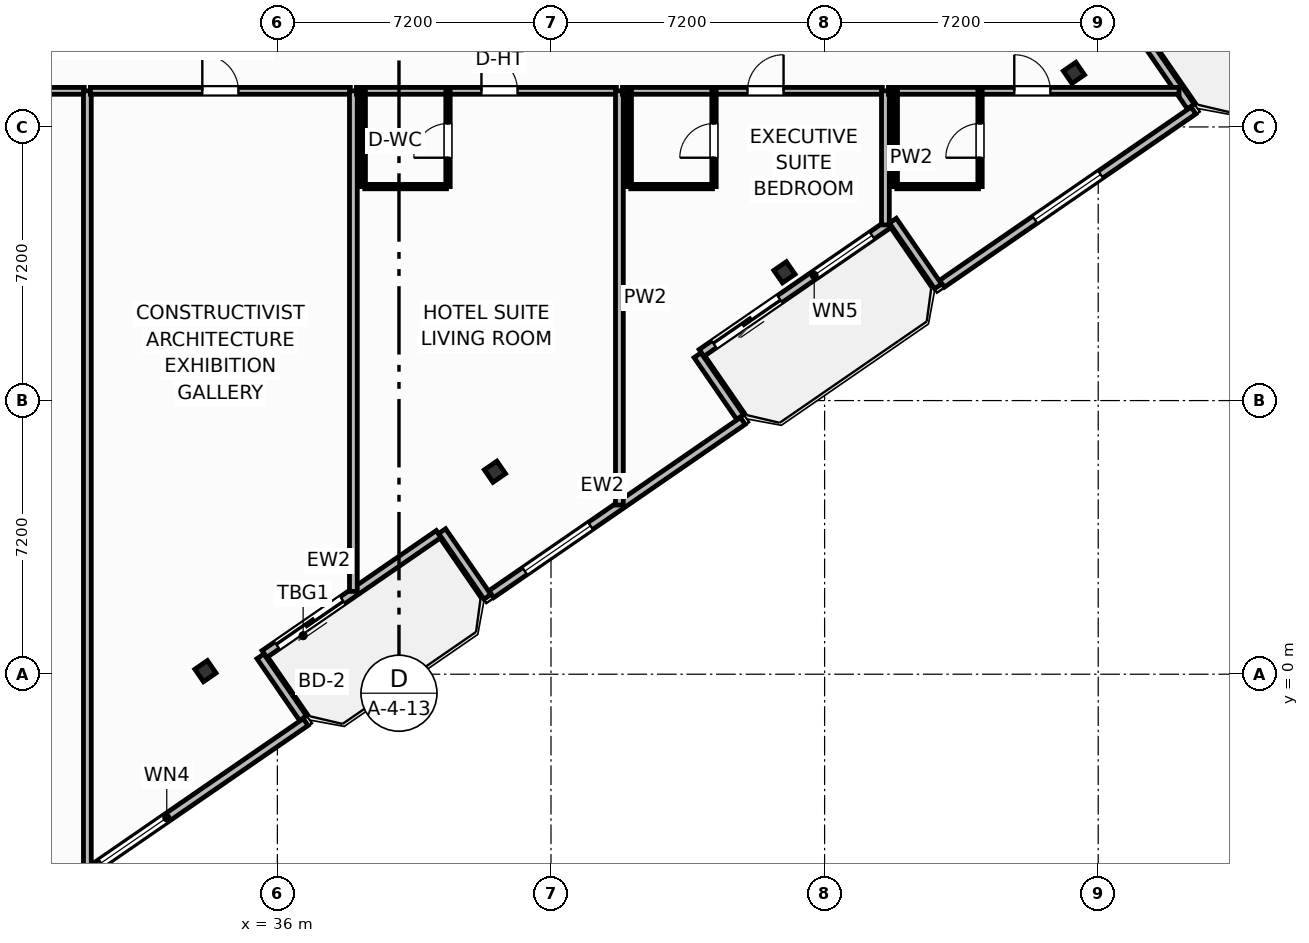
"""IFC4 building model, lengths in metres.
Left out: names, types, materials, properties, quantities, classifications, styles, units other than length and angle.
Written with IfcOpenShell. Run it as: python <this file> out.ifc"""

import sys

from ifc_helpers import new_model, si_unit, direction, frame, frame_2d, origin, origin_2d, place, context, subcontext, project, spatial, rectangle, i_section, extrude, element, fill, save


model = new_model("IFC4")
c1 = context("Model", 3, precision=1e-05, world=origin(), true_north=direction((0.0, 1.0)))
c2 = subcontext(c1, "Body", "Model", "MODEL_VIEW")
j1 = project(units=[si_unit("LENGTHUNIT", "METRE"), si_unit("PLANEANGLEUNIT", "RADIAN")], contexts=[c1])
p1 = place(None, origin())
s1 = spatial("IfcSite", under=j1, at=p1, CompositionType="ELEMENT")
p2 = place(p1, origin())
s2 = spatial("IfcBuilding", under=s1, at=p2, CompositionType="ELEMENT")
p3 = place(p2, frame((0.0, 0.0, 265.6)))
s3 = spatial("IfcBuildingStorey", under=s2, at=p3, CompositionType="ELEMENT", Elevation=265.6)
for number, where, z_axis, x_axis in (
    (1, (34.107, 0.081, 0.0), (0.0, 0.0, 1.0), (0.824, 0.567, 0.0)),
    (2, (41.725, 5.328, 0.0), (0.0, 0.0, 1.0), (0.824, 0.567, 0.0)),
    (3, (49.343, 10.575, 0.0), (0.0, 0.0, 1.0), (0.824, 0.567, 0.0)),
    (4, (56.96, 15.823, 0.0), (0.0, 0.0, 1.0), (0.824, 0.567, 0.0)),
):
    element("IfcColumn", number, at=place(p3, frame(where, z_axis=z_axis, x_axis=x_axis)), inside=s3, PredefinedType="COLUMN", context=c2, shape_type="SweptSolid", body=[
        extrude(i_section(OverallWidth=0.401, OverallDepth=0.399, WebThickness=0.025, FlangeThickness=0.04, FilletRadius=0.022, at=origin_2d()), origin(), (0.0, 0.0, 1.0), 3.7),
    ])
p4 = place(p3, frame((40.244, 3.688, 0.0), z_axis=(0.0, 0.0, 1.0), x_axis=(-0.823541290762, -0.567256328665, 0.0)))
e5 = element("IfcWall", 5, at=p4, inside=s3, PredefinedType="SOLIDWALL", context=c2, shape_type="SweptSolid", body=[
    extrude(rectangle(XDim=5.567, YDim=0.22, at=frame_2d((2.784, 0.0))), origin(), (0.0, 0.0, 1.0), 2.73),
])
p5 = place(p4, frame((3.067, 0.0, 0.0)))
e6 = element("IfcOpeningElement", 6, at=p5, cuts=e5, PredefinedType="OPENING", context=c2, shape_type="SweptSolid", body=[
    extrude(rectangle(XDim=2.1, YDim=2.3, at=frame_2d((1.05, 1.15))), frame((0.0, 0.12, 0.0), z_axis=(0.0, -1.0, 0.0), x_axis=(1.0, 0.0, 0.0)), (0.0, 0.0, 1.0), 0.24),
])
p6 = place(p3, frame((52.103, 11.857, 0.0), z_axis=(0.0, 0.0, 1.0), x_axis=(-0.823534636215, -0.567265989598, 0.0)))
e7 = element("IfcWall", 7, at=p6, inside=s3, PredefinedType="SOLIDWALL", context=c2, shape_type="SweptSolid", body=[
    extrude(rectangle(XDim=6.0, YDim=0.22, at=frame_2d((3.0, 0.0))), origin(), (0.0, 0.0, 1.0), 2.73),
])
p7 = place(p6, frame((3.5, 0.0, 0.0)))
e8 = element("IfcOpeningElement", 8, at=p7, cuts=e7, PredefinedType="OPENING", context=c2, shape_type="SweptSolid", body=[
    extrude(rectangle(XDim=2.1, YDim=2.3, at=frame_2d((1.05, 1.15))), frame((0.0, 0.12, 0.0), z_axis=(0.0, -1.0, 0.0), x_axis=(1.0, 0.0, 0.0)), (0.0, 0.0, 1.0), 0.24),
])
p8 = place(p6, frame((0.55, 0.0, 0.75)))
e9 = element("IfcOpeningElement", 9, at=p8, cuts=e7, PredefinedType="OPENING", context=c2, shape_type="SweptSolid", body=[
    extrude(rectangle(XDim=1.85, YDim=1.75, at=frame_2d((0.925, 0.875))), frame((0.0, 0.12, 0.0), z_axis=(0.0, -1.0, 0.0), x_axis=(1.0, 0.0, 0.0)), (0.0, 0.0, 1.0), 0.24),
])
p9 = place(p3, frame((27.704, -7.488, 0.0), z_axis=(0.0, 0.0, 1.0), x_axis=(0.823529068157, 0.567274073003, 0.0)))
e10 = element("IfcWall", 10, at=p9, inside=s3, PredefinedType="SOLIDWALL", context=c2, shape_type="SweptSolid", body=[
    extrude(rectangle(XDim=10.98, YDim=0.22, at=frame_2d((5.49, 0.0))), origin(), (0.0, 0.0, 1.0), 2.73),
])
p10 = place(p9, frame((4.44, 0.0, 0.8)))
e11 = element("IfcOpeningElement", 11, at=p10, cuts=e10, PredefinedType="OPENING", context=c2, shape_type="SweptSolid", body=[
    extrude(rectangle(XDim=2.1, YDim=1.75, at=frame_2d((1.05, 0.875))), frame((0.0, 0.12, 0.0), z_axis=(0.0, -1.0, 0.0), x_axis=(1.0, 0.0, 0.0)), (0.0, 0.0, 1.0), 0.24),
])
p11 = place(p3, frame((36.675, -1.156, 0.0), z_axis=(0.0, 0.0, 1.0), x_axis=(-0.567215821234, 0.823569190865, 0.0)))
e12 = element("IfcWall", 12, at=p11, inside=s3, PredefinedType="SOLIDWALL", context=c2, shape_type="SweptSolid", body=[
    extrude(rectangle(XDim=1.975, YDim=0.22, at=frame_2d((0.988, 0.0))), origin(), (0.0, 0.0, 1.0), 2.73),
])
p12 = place(p3, frame((40.337, 3.765, 0.0), z_axis=(0.0, 0.0, 1.0), x_axis=(0.567352541689, -0.823475010816, 0.0)))
e13 = element("IfcWall", 13, at=p12, inside=s3, PredefinedType="SOLIDWALL", context=c2, shape_type="SweptSolid", body=[
    extrude(rectangle(XDim=2.1, YDim=0.22, at=frame_2d((1.05, 0.0))), origin(), (0.0, 0.0, 1.0), 2.73),
])
p13 = place(p3, frame((41.631, 2.106, 0.0), z_axis=(0.0, 0.0, 1.0), x_axis=(0.823530942962, 0.56727135128, 0.0)))
e14 = element("IfcWall", 14, at=p13, inside=s3, PredefinedType="SOLIDWALL", context=c2, shape_type="SweptSolid", body=[
    extrude(rectangle(XDim=8.035, YDim=0.22, at=frame_2d((4.018, 0.0))), origin(), (0.0, 0.0, 1.0), 2.73),
])
p14 = place(p13, frame((1.068, 0.0, 0.8)))
e15 = element("IfcOpeningElement", 15, at=p14, cuts=e14, PredefinedType="OPENING", context=c2, shape_type="SweptSolid", body=[
    extrude(rectangle(XDim=2.1, YDim=1.75, at=frame_2d((1.05, 0.875))), frame((0.0, 0.12, 0.0), z_axis=(0.0, -1.0, 0.0), x_axis=(1.0, 0.0, 0.0)), (0.0, 0.0, 1.0), 0.24),
])
p15 = place(p3, frame((48.177, 6.767, 0.0), z_axis=(0.0, 0.0, 1.0), x_axis=(-0.567273565974, 0.823529417415, 0.0)))
e16 = element("IfcWall", 16, at=p15, inside=s3, PredefinedType="SOLIDWALL", context=c2, shape_type="SweptSolid", body=[
    extrude(rectangle(XDim=1.975, YDim=0.22, at=frame_2d((0.988, 0.0))), origin(), (0.0, 0.0, 1.0), 2.73),
])
p16 = place(p3, frame((52.196, 11.933, 0.0), z_axis=(0.0, 0.0, 1.0), x_axis=(0.56729822855, -0.823512428494, 0.0)))
e17 = element("IfcWall", 17, at=p16, inside=s3, PredefinedType="SOLIDWALL", context=c2, shape_type="SweptSolid", body=[
    extrude(rectangle(XDim=2.1, YDim=0.22, at=frame_2d((1.05, 0.0))), origin(), (0.0, 0.0, 1.0), 2.73),
])
p17 = place(p3, frame((53.49, 10.275, 0.0), z_axis=(0.0, 0.0, 1.0), x_axis=(0.823530942962, 0.56727135128, 0.0)))
e18 = element("IfcWall", 18, at=p17, inside=s3, PredefinedType="SOLIDWALL", context=c2, shape_type="SweptSolid", body=[
    extrude(rectangle(XDim=8.035, YDim=0.22, at=frame_2d((4.018, 0.0))), origin(), (0.0, 0.0, 1.0), 2.73),
])
p18 = place(p17, frame((2.968, 0.0, 0.8)))
e19 = element("IfcOpeningElement", 19, at=p18, cuts=e18, PredefinedType="OPENING", context=c2, shape_type="SweptSolid", body=[
    extrude(rectangle(XDim=2.1, YDim=1.75, at=frame_2d((1.05, 0.875))), frame((0.0, 0.12, 0.0), z_axis=(0.0, -1.0, 0.0), x_axis=(1.0, 0.0, 0.0)), (0.0, 0.0, 1.0), 0.24),
])
p19 = place(p3, frame((60.036, 14.936, 0.0), z_axis=(0.0, 0.0, 1.0), x_axis=(-0.567273565974, 0.823529417415, 0.0)))
e20 = element("IfcWall", 20, at=p19, inside=s3, PredefinedType="SOLIDWALL", context=c2, shape_type="SweptSolid", body=[
    extrude(rectangle(XDim=1.975, YDim=0.22, at=frame_2d((0.988, 0.0))), origin(), (0.0, 0.0, 1.0), 2.73),
])
p20 = place(p3, frame((24.08, 15.35, 0.0), z_axis=(0.0, 0.0, 1.0), x_axis=(1.0, 0.0, 0.0)))
e21 = element("IfcWall", 21, at=p20, inside=s3, PredefinedType="PARTITIONING", context=c2, shape_type="SweptSolid", body=[
    extrude(rectangle(XDim=6.84, YDim=0.18, at=frame_2d((3.42, 0.0))), origin(), (0.0, 0.0, 1.0), 3.45),
])
p21 = place(p20, frame((2.945, 0.0, 0.0)))
e22 = element("IfcOpeningElement", 22, at=p21, cuts=e21, PredefinedType="OPENING", context=c2, shape_type="SweptSolid", body=[
    extrude(rectangle(XDim=0.95, YDim=2.05, at=frame_2d((0.475, 1.025))), frame((0.0, 0.1, 0.0), z_axis=(0.0, -1.0, 0.0), x_axis=(1.0, 0.0, 0.0)), (0.0, 0.0, 1.0), 0.2),
])
p22 = place(p3, frame((31.0, -5.112, 0.0), z_axis=(0.0, 0.0, 1.0), x_axis=(0.0, 1.0, 0.0)))
e23 = element("IfcWall", 23, at=p22, inside=s3, PredefinedType="PARTITIONING", context=c2, shape_type="SweptSolid", body=[
    extrude(rectangle(XDim=20.462, YDim=0.205, at=frame_2d((10.231, 0.0))), origin(), (0.0, 0.0, 1.0), 3.45),
])
p23 = place(p3, frame((31.08, 15.35, 0.0), z_axis=(0.0, 0.0, 1.0), x_axis=(1.0, 0.0, 0.0)))
e24 = element("IfcWall", 24, at=p23, inside=s3, PredefinedType="PARTITIONING", context=c2, shape_type="SweptSolid", body=[
    extrude(rectangle(XDim=6.84, YDim=0.18, at=frame_2d((3.42, 0.0))), origin(), (0.0, 0.0, 1.0), 3.45),
])
p24 = place(p23, frame((2.945, 0.0, 0.0)))
e25 = element("IfcOpeningElement", 25, at=p24, cuts=e24, PredefinedType="OPENING", context=c2, shape_type="SweptSolid", body=[
    extrude(rectangle(XDim=0.95, YDim=2.05, at=frame_2d((0.475, 1.025))), frame((0.0, 0.1, 0.0), z_axis=(0.0, -1.0, 0.0), x_axis=(1.0, 0.0, 0.0)), (0.0, 0.0, 1.0), 0.2),
])
p25 = place(p3, frame((38.0, 2.179, 0.0), z_axis=(0.0, 0.0, 1.0), x_axis=(0.0, 1.0, 0.0)))
e26 = element("IfcWall", 26, at=p25, inside=s3, PredefinedType="PARTITIONING", context=c2, shape_type="SweptSolid", body=[
    extrude(rectangle(XDim=13.171, YDim=0.205, at=frame_2d((6.585, 0.0))), origin(), (0.0, 0.0, 1.0), 3.45),
])
p26 = place(p3, frame((38.08, 15.35, 0.0), z_axis=(0.0, 0.0, 1.0), x_axis=(1.0, 0.0, 0.0)))
e27 = element("IfcWall", 27, at=p26, inside=s3, PredefinedType="PARTITIONING", context=c2, shape_type="SweptSolid", body=[
    extrude(rectangle(XDim=6.84, YDim=0.18, at=frame_2d((3.42, 0.0))), origin(), (0.0, 0.0, 1.0), 3.45),
])
p27 = place(p26, frame((3.29, 0.0, 0.0)))
e28 = element("IfcOpeningElement", 28, at=p27, cuts=e27, PredefinedType="OPENING", context=c2, shape_type="SweptSolid", body=[
    extrude(rectangle(XDim=0.95, YDim=2.15, at=frame_2d((0.475, 1.075))), frame((0.0, 0.1, 0.0), z_axis=(0.0, -1.0, 0.0), x_axis=(1.0, 0.0, 0.0)), (0.0, 0.0, 1.0), 0.2),
])
p28 = place(p3, frame((38.3, 12.83, 0.0), z_axis=(0.0, 0.0, 1.0), x_axis=(1.0, 0.0, 0.0)))
e29 = element("IfcWall", 29, at=p28, inside=s3, PredefinedType="PARTITIONING", context=c2, shape_type="SweptSolid", body=[
    extrude(rectangle(XDim=2.15, YDim=0.115, at=frame_2d((1.075, 0.0))), origin(), (0.0, 0.0, 1.0), 3.45),
])
p29 = place(p3, frame((40.49, 12.83, 0.0), z_axis=(0.0, 0.0, 1.0), x_axis=(0.0, 1.0, 0.0)))
e30 = element("IfcWall", 30, at=p29, inside=s3, PredefinedType="PARTITIONING", context=c2, shape_type="SweptSolid", body=[
    extrude(rectangle(XDim=2.52, YDim=0.115, at=frame_2d((1.26, 0.0))), origin(), (0.0, 0.0, 1.0), 3.45),
])
p30 = place(p29, frame((0.76, 0.0, 0.0)))
e31 = element("IfcOpeningElement", 31, at=p30, cuts=e30, PredefinedType="OPENING", context=c2, shape_type="SweptSolid", body=[
    extrude(rectangle(XDim=0.9, YDim=2.05, at=frame_2d((0.45, 1.025))), frame((0.0, 0.067, 0.0), z_axis=(0.0, -1.0, 0.0), x_axis=(1.0, 0.0, 0.0)), (0.0, 0.0, 1.0), 0.135),
])
p31 = place(p3, frame((38.26, 12.83, 0.0), z_axis=(0.0, 0.0, 1.0), x_axis=(0.0, 1.0, 0.0)))
e32 = element("IfcWall", 32, at=p31, inside=s3, PredefinedType="PARTITIONING", context=c2, shape_type="SweptSolid", body=[
    extrude(rectangle(XDim=2.52, YDim=0.115, at=frame_2d((1.26, 0.0))), origin(), (0.0, 0.0, 1.0), 3.45),
])
p32 = place(p3, frame((45.0, 4.451, 0.0), z_axis=(0.0, 0.0, 1.0), x_axis=(0.0, 1.0, 0.0)))
e33 = element("IfcWall", 33, at=p32, inside=s3, PredefinedType="PARTITIONING", context=c2, shape_type="SweptSolid", body=[
    extrude(rectangle(XDim=10.899, YDim=0.205, at=frame_2d((5.45, 0.0))), origin(), (0.0, 0.0, 1.0), 3.45),
])
p33 = place(p3, frame((45.08, 15.35, 0.0), z_axis=(0.0, 0.0, 1.0), x_axis=(1.0, 0.0, 0.0)))
e34 = element("IfcWall", 34, at=p33, inside=s3, PredefinedType="PARTITIONING", context=c2, shape_type="SweptSolid", body=[
    extrude(rectangle(XDim=6.84, YDim=0.18, at=frame_2d((3.42, 0.0))), origin(), (0.0, 0.0, 1.0), 3.45),
])
p34 = place(p33, frame((3.29, 0.0, 0.0)))
e35 = element("IfcOpeningElement", 35, at=p34, cuts=e34, PredefinedType="OPENING", context=c2, shape_type="SweptSolid", body=[
    extrude(rectangle(XDim=0.95, YDim=2.15, at=frame_2d((0.475, 1.075))), frame((0.0, 0.1, 0.0), z_axis=(0.0, -1.0, 0.0), x_axis=(1.0, 0.0, 0.0)), (0.0, 0.0, 1.0), 0.2),
])
p35 = place(p3, frame((45.3, 12.83, 0.0), z_axis=(0.0, 0.0, 1.0), x_axis=(1.0, 0.0, 0.0)))
e36 = element("IfcWall", 36, at=p35, inside=s3, PredefinedType="PARTITIONING", context=c2, shape_type="SweptSolid", body=[
    extrude(rectangle(XDim=2.15, YDim=0.115, at=frame_2d((1.075, 0.0))), origin(), (0.0, 0.0, 1.0), 3.45),
])
p36 = place(p3, frame((47.49, 12.83, 0.0), z_axis=(0.0, 0.0, 1.0), x_axis=(0.0, 1.0, 0.0)))
e37 = element("IfcWall", 37, at=p36, inside=s3, PredefinedType="PARTITIONING", context=c2, shape_type="SweptSolid", body=[
    extrude(rectangle(XDim=2.52, YDim=0.115, at=frame_2d((1.26, 0.0))), origin(), (0.0, 0.0, 1.0), 3.45),
])
p37 = place(p36, frame((0.76, 0.0, 0.0)))
e38 = element("IfcOpeningElement", 38, at=p37, cuts=e37, PredefinedType="OPENING", context=c2, shape_type="SweptSolid", body=[
    extrude(rectangle(XDim=0.9, YDim=2.05, at=frame_2d((0.45, 1.025))), frame((0.0, 0.067, 0.0), z_axis=(0.0, -1.0, 0.0), x_axis=(1.0, 0.0, 0.0)), (0.0, 0.0, 1.0), 0.135),
])
p38 = place(p3, frame((45.26, 12.83, 0.0), z_axis=(0.0, 0.0, 1.0), x_axis=(0.0, 1.0, 0.0)))
e39 = element("IfcWall", 39, at=p38, inside=s3, PredefinedType="PARTITIONING", context=c2, shape_type="SweptSolid", body=[
    extrude(rectangle(XDim=2.52, YDim=0.115, at=frame_2d((1.26, 0.0))), origin(), (0.0, 0.0, 1.0), 3.45),
])
p39 = place(p3, frame((52.0, 11.823, 0.0), z_axis=(0.0, 0.0, 1.0), x_axis=(0.0, 1.0, 0.0)))
e40 = element("IfcWall", 40, at=p39, inside=s3, PredefinedType="PARTITIONING", context=c2, shape_type="SweptSolid", body=[
    extrude(rectangle(XDim=3.527, YDim=0.205, at=frame_2d((1.764, 0.0))), origin(), (0.0, 0.0, 1.0), 3.45),
])
p40 = place(p3, frame((52.08, 15.35, 0.0), z_axis=(0.0, 0.0, 1.0), x_axis=(1.0, 0.0, 0.0)))
e41 = element("IfcWall", 41, at=p40, inside=s3, PredefinedType="PARTITIONING", context=c2, shape_type="SweptSolid", body=[
    extrude(rectangle(XDim=7.646, YDim=0.18, at=frame_2d((3.823, 0.0))), origin(), (0.0, 0.0, 1.0), 3.45),
])
p41 = place(p40, frame((3.311, 0.0, 0.0)))
e42 = element("IfcOpeningElement", 42, at=p41, cuts=e41, PredefinedType="OPENING", context=c2, shape_type="SweptSolid", body=[
    extrude(rectangle(XDim=0.95, YDim=2.15, at=frame_2d((0.475, 1.075))), frame((0.0, 0.1, 0.0), z_axis=(0.0, -1.0, 0.0), x_axis=(1.0, 0.0, 0.0)), (0.0, 0.0, 1.0), 0.2),
])
p42 = place(p3, frame((52.3, 12.83, 0.0), z_axis=(0.0, 0.0, 1.0), x_axis=(1.0, 0.0, 0.0)))
e43 = element("IfcWall", 43, at=p42, inside=s3, PredefinedType="PARTITIONING", context=c2, shape_type="SweptSolid", body=[
    extrude(rectangle(XDim=2.15, YDim=0.115, at=frame_2d((1.075, 0.0))), origin(), (0.0, 0.0, 1.0), 3.45),
])
p43 = place(p3, frame((54.49, 12.83, 0.0), z_axis=(0.0, 0.0, 1.0), x_axis=(0.0, 1.0, 0.0)))
e44 = element("IfcWall", 44, at=p43, inside=s3, PredefinedType="PARTITIONING", context=c2, shape_type="SweptSolid", body=[
    extrude(rectangle(XDim=2.52, YDim=0.115, at=frame_2d((1.26, 0.0))), origin(), (0.0, 0.0, 1.0), 3.45),
])
p44 = place(p43, frame((0.76, 0.0, 0.0)))
e45 = element("IfcOpeningElement", 45, at=p44, cuts=e44, PredefinedType="OPENING", context=c2, shape_type="SweptSolid", body=[
    extrude(rectangle(XDim=0.9, YDim=2.05, at=frame_2d((0.45, 1.025))), frame((0.0, 0.067, 0.0), z_axis=(0.0, -1.0, 0.0), x_axis=(1.0, 0.0, 0.0)), (0.0, 0.0, 1.0), 0.135),
])
p45 = place(p3, frame((52.26, 12.83, 0.0), z_axis=(0.0, 0.0, 1.0), x_axis=(0.0, 1.0, 0.0)))
e46 = element("IfcWall", 46, at=p45, inside=s3, PredefinedType="PARTITIONING", context=c2, shape_type="SweptSolid", body=[
    extrude(rectangle(XDim=2.52, YDim=0.115, at=frame_2d((1.26, 0.0))), origin(), (0.0, 0.0, 1.0), 3.45),
])
p46 = place(p5, origin())
e47 = element("IfcDoor", 47, at=p46, inside=s3, OperationType="SLIDING_TO_LEFT", PredefinedType="DOOR", context=c2, shape_type="SweptSolid", body=[
    extrude(rectangle(XDim=2.1, YDim=2.3, at=frame_2d((1.05, 1.15))), frame((0.0, 0.025, 0.0), z_axis=(0.0, -1.0, 0.0), x_axis=(1.0, 0.0, 0.0)), (0.0, 0.0, 1.0), 0.05),
])
fill(e6, e47)
p47 = place(p7, origin())
e48 = element("IfcDoor", 48, at=p47, inside=s3, OperationType="SLIDING_TO_LEFT", PredefinedType="DOOR", context=c2, shape_type="SweptSolid", body=[
    extrude(rectangle(XDim=2.1, YDim=2.3, at=frame_2d((1.05, 1.15))), frame((0.0, 0.025, 0.0), z_axis=(0.0, -1.0, 0.0), x_axis=(1.0, 0.0, 0.0)), (0.0, 0.0, 1.0), 0.05),
])
fill(e8, e48)
p48 = place(p8, origin())
e49 = element("IfcWindow", 49, at=p48, inside=s3, PartitioningType="SINGLE_PANEL", PredefinedType="WINDOW", context=c2, shape_type="SweptSolid", body=[
    extrude(rectangle(XDim=1.85, YDim=1.75, at=frame_2d((0.925, 0.875))), frame((0.0, 0.03, 0.0), z_axis=(0.0, -1.0, 0.0), x_axis=(1.0, 0.0, 0.0)), (0.0, 0.0, 1.0), 0.06),
])
fill(e9, e49)
p49 = place(p10, origin())
e50 = element("IfcWindow", 50, at=p49, inside=s3, PartitioningType="SINGLE_PANEL", PredefinedType="WINDOW", context=c2, shape_type="SweptSolid", body=[
    extrude(rectangle(XDim=2.1, YDim=1.75, at=frame_2d((1.05, 0.875))), frame((0.0, 0.03, 0.0), z_axis=(0.0, -1.0, 0.0), x_axis=(1.0, 0.0, 0.0)), (0.0, 0.0, 1.0), 0.06),
])
fill(e11, e50)
p50 = place(p14, origin())
e51 = element("IfcWindow", 51, at=p50, inside=s3, PartitioningType="SINGLE_PANEL", PredefinedType="WINDOW", context=c2, shape_type="SweptSolid", body=[
    extrude(rectangle(XDim=2.1, YDim=1.75, at=frame_2d((1.05, 0.875))), frame((0.0, 0.03, 0.0), z_axis=(0.0, -1.0, 0.0), x_axis=(1.0, 0.0, 0.0)), (0.0, 0.0, 1.0), 0.06),
])
fill(e15, e51)
p51 = place(p18, origin())
e52 = element("IfcWindow", 52, at=p51, inside=s3, PartitioningType="SINGLE_PANEL", PredefinedType="WINDOW", context=c2, shape_type="SweptSolid", body=[
    extrude(rectangle(XDim=2.1, YDim=1.75, at=frame_2d((1.05, 0.875))), frame((0.0, 0.03, 0.0), z_axis=(0.0, -1.0, 0.0), x_axis=(1.0, 0.0, 0.0)), (0.0, 0.0, 1.0), 0.06),
])
fill(e19, e52)
p52 = place(p24, origin())
e53 = element("IfcDoor", 53, at=p52, inside=s3, OperationType="SINGLE_SWING_LEFT", PredefinedType="DOOR", context=c2, shape_type="SweptSolid", body=[
    extrude(rectangle(XDim=0.95, YDim=2.05, at=frame_2d((0.475, 1.025))), frame((0.0, 0.025, 0.0), z_axis=(0.0, -1.0, 0.0), x_axis=(1.0, 0.0, 0.0)), (0.0, 0.0, 1.0), 0.05),
])
fill(e25, e53)
p53 = place(p27, origin())
e54 = element("IfcDoor", 54, at=p53, inside=s3, OperationType="SINGLE_SWING_LEFT", PredefinedType="DOOR", context=c2, shape_type="SweptSolid", body=[
    extrude(rectangle(XDim=0.95, YDim=2.15, at=frame_2d((0.475, 1.075))), frame((0.0, 0.025, 0.0), z_axis=(0.0, -1.0, 0.0), x_axis=(1.0, 0.0, 0.0)), (0.0, 0.0, 1.0), 0.05),
])
fill(e28, e54)
p54 = place(p30, origin())
e55 = element("IfcDoor", 55, at=p54, inside=s3, OperationType="SINGLE_SWING_LEFT", PredefinedType="DOOR", context=c2, shape_type="SweptSolid", body=[
    extrude(rectangle(XDim=0.9, YDim=2.05, at=frame_2d((0.45, 1.025))), frame((0.0, 0.025, 0.0), z_axis=(0.0, -1.0, 0.0), x_axis=(1.0, 0.0, 0.0)), (0.0, 0.0, 1.0), 0.05),
])
fill(e31, e55)
p55 = place(p34, origin())
e56 = element("IfcDoor", 56, at=p55, inside=s3, OperationType="SINGLE_SWING_RIGHT", PredefinedType="DOOR", context=c2, shape_type="SweptSolid", body=[
    extrude(rectangle(XDim=0.95, YDim=2.15, at=frame_2d((0.475, 1.075))), frame((0.0, 0.025, 0.0), z_axis=(0.0, -1.0, 0.0), x_axis=(1.0, 0.0, 0.0)), (0.0, 0.0, 1.0), 0.05),
])
fill(e35, e56)
p56 = place(p37, origin())
e57 = element("IfcDoor", 57, at=p56, inside=s3, OperationType="SINGLE_SWING_LEFT", PredefinedType="DOOR", context=c2, shape_type="SweptSolid", body=[
    extrude(rectangle(XDim=0.9, YDim=2.05, at=frame_2d((0.45, 1.025))), frame((0.0, 0.025, 0.0), z_axis=(0.0, -1.0, 0.0), x_axis=(1.0, 0.0, 0.0)), (0.0, 0.0, 1.0), 0.05),
])
fill(e38, e57)
p57 = place(p41, origin())
e58 = element("IfcDoor", 58, at=p57, inside=s3, OperationType="SINGLE_SWING_LEFT", PredefinedType="DOOR", context=c2, shape_type="SweptSolid", body=[
    extrude(rectangle(XDim=0.95, YDim=2.15, at=frame_2d((0.475, 1.075))), frame((0.0, 0.025, 0.0), z_axis=(0.0, -1.0, 0.0), x_axis=(1.0, 0.0, 0.0)), (0.0, 0.0, 1.0), 0.05),
])
fill(e42, e58)
p58 = place(p44, origin())
e59 = element("IfcDoor", 59, at=p58, inside=s3, OperationType="SINGLE_SWING_LEFT", PredefinedType="DOOR", context=c2, shape_type="SweptSolid", body=[
    extrude(rectangle(XDim=0.9, YDim=2.05, at=frame_2d((0.45, 1.025))), frame((0.0, 0.025, 0.0), z_axis=(0.0, -1.0, 0.0), x_axis=(1.0, 0.0, 0.0)), (0.0, 0.0, 1.0), 0.05),
])
fill(e45, e59)
save(model, sys.argv[1])
